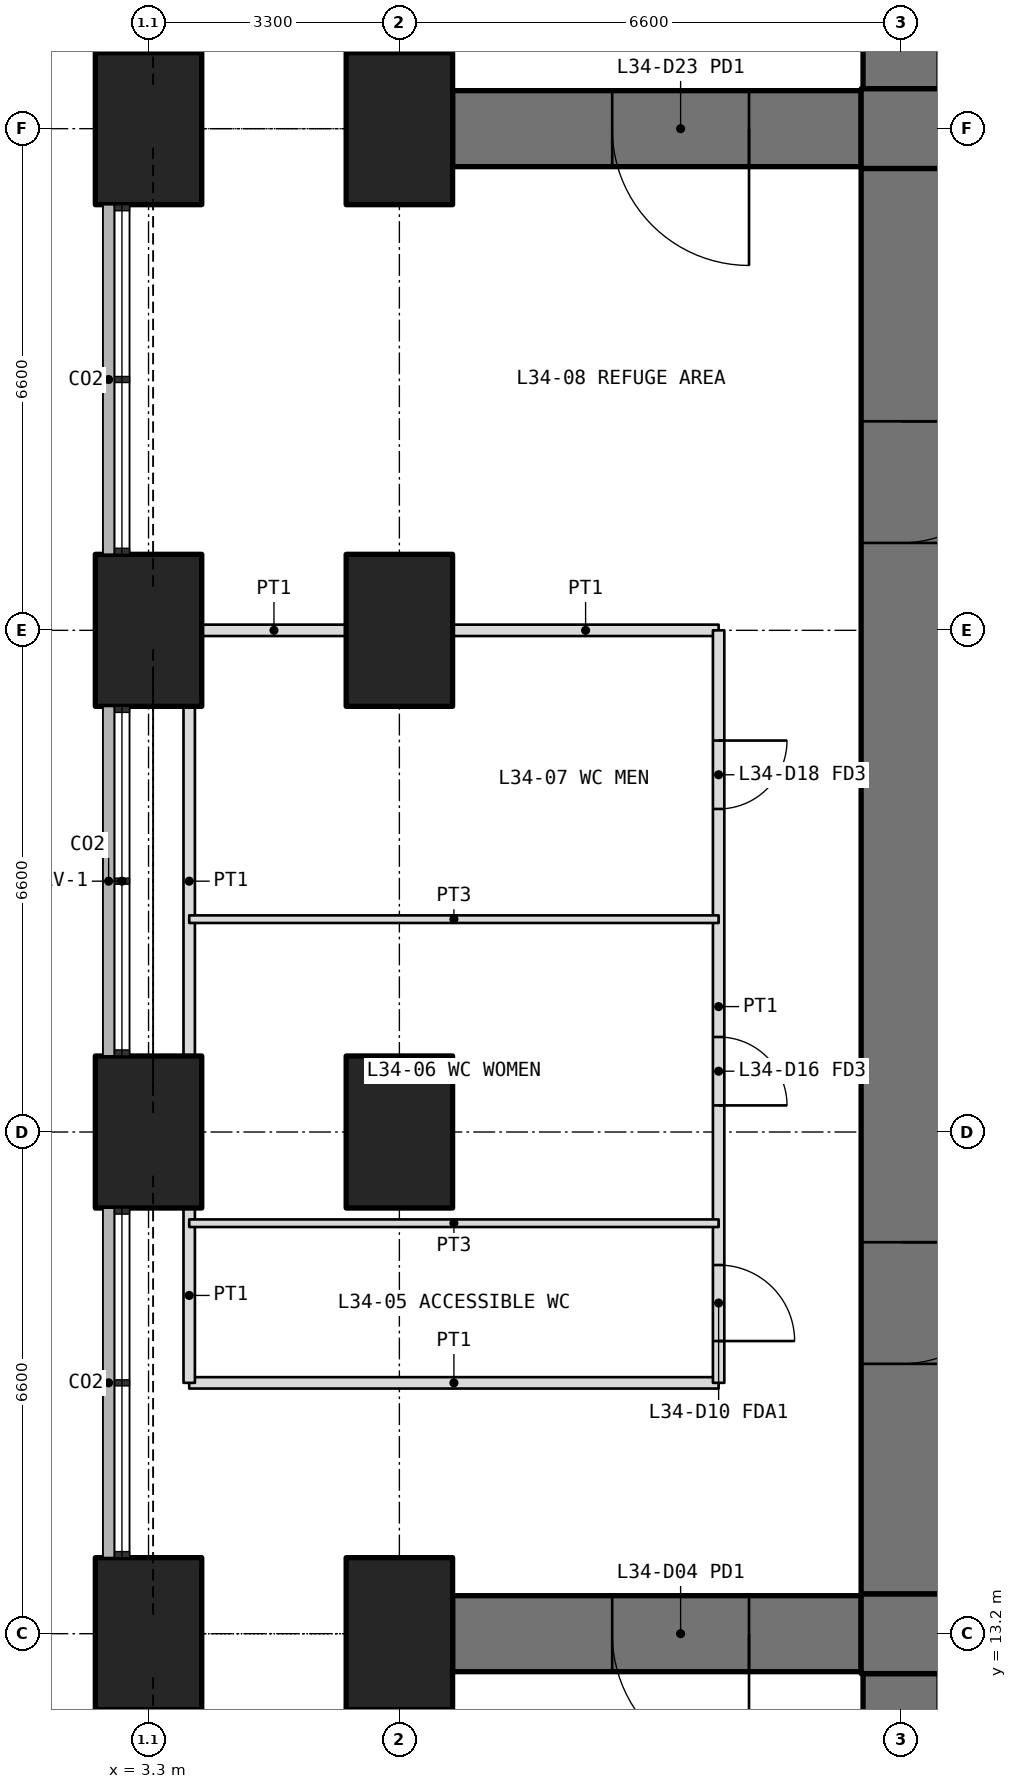
"""IFC4 building model, lengths in metres.
Left out: names, types, materials, properties, quantities, classifications, styles, units other than length and angle.
Written with IfcOpenShell. Run it as: python <this file> out.ifc"""

import sys

from ifc_helpers import new_model, si_unit, direction, frame, frame_2d, origin, origin_2d, place, context, subcontext, project, spatial, rectangle, extrude, element, fill, save


model = new_model("IFC4")
c1 = context("Model", 3, precision=1e-05, world=origin(), true_north=direction((0.0, 1.0)))
c2 = subcontext(c1, "Body", "Model", "MODEL_VIEW")
j1 = project(units=[si_unit("LENGTHUNIT", "METRE"), si_unit("PLANEANGLEUNIT", "RADIAN")], contexts=[c1])
p1 = place(None, origin())
s1 = spatial("IfcSite", under=j1, at=p1, CompositionType="ELEMENT")
p2 = place(p1, origin())
s2 = spatial("IfcBuilding", under=s1, at=p2, CompositionType="ELEMENT")
p3 = place(p2, frame((0.0, 0.0, 149.4)))
s3 = spatial("IfcBuildingStorey", under=s2, at=p3, CompositionType="ELEMENT", Elevation=149.4)
for number, where, z_axis, x_axis in (
    (1, (3.3, 13.2, 0.0), (0.0, 0.0, 1.0), (0.0, 1.0, 0.0)),
    (2, (3.3, 19.8, 0.0), (0.0, 0.0, 1.0), (0.0, 1.0, 0.0)),
    (3, (3.3, 26.4, 0.0), (0.0, 0.0, 1.0), (0.0, 1.0, 0.0)),
    (4, (3.3, 33.0, 0.0), (0.0, 0.0, 1.0), (0.0, 1.0, 0.0)),
    (5, (6.6, 13.2, 0.0), (0.0, 0.0, 1.0), (0.0, 1.0, 0.0)),
    (6, (6.6, 19.8, 0.0), (0.0, 0.0, 1.0), (0.0, 1.0, 0.0)),
    (7, (6.6, 26.4, 0.0), (0.0, 0.0, 1.0), (0.0, 1.0, 0.0)),
    (8, (6.6, 33.0, 0.0), (0.0, 0.0, 1.0), (0.0, 1.0, 0.0)),
):
    element("IfcColumn", number, at=place(p3, frame(where, z_axis=z_axis, x_axis=x_axis)), inside=s3, PredefinedType="COLUMN", context=c2, shape_type="SweptSolid", body=[
        extrude(rectangle(XDim=2.0, YDim=1.4, at=origin_2d()), origin(), (0.0, 0.0, 1.0), 6.3),
    ])
p4 = place(p3, frame((13.2, 12.675, 0.0), z_axis=(0.0, 0.0, 1.0), x_axis=(0.0, -1.0, 0.0)))
e9 = element("IfcWall", 9, at=p4, inside=s3, PredefinedType="SHEAR", context=c2, shape_type="SweptSolid", body=[
    extrude(rectangle(XDim=8.675, YDim=1.0, at=frame_2d((4.337, 0.0))), origin(), (0.0, 0.0, 1.0), 6.0),
])
p5 = place(p4, frame((1.475, 0.0, 0.0)))
e10 = element("IfcOpeningElement", 10, at=p5, cuts=e9, PredefinedType="OPENING", context=c2, shape_type="SweptSolid", body=[
    extrude(rectangle(XDim=1.8, YDim=2.4, at=frame_2d((0.9, 1.2))), frame((0.0, 0.51, 0.0), z_axis=(0.0, -1.0, 0.0), x_axis=(1.0, 0.0, 0.0)), (0.0, 0.0, 1.0), 1.02),
])
p6 = place(p3, frame((13.2, 33.525, 0.0), z_axis=(0.0, 0.0, 1.0), x_axis=(0.0, 1.0, 0.0)))
e11 = element("IfcWall", 11, at=p6, inside=s3, PredefinedType="SHEAR", context=c2, shape_type="SweptSolid", body=[
    extrude(rectangle(XDim=8.675, YDim=1.0, at=frame_2d((4.337, 0.0))), origin(), (0.0, 0.0, 1.0), 6.0),
])
p7 = place(p6, frame((1.475, 0.0, 0.0)))
e12 = element("IfcOpeningElement", 12, at=p7, cuts=e11, PredefinedType="OPENING", context=c2, shape_type="SweptSolid", body=[
    extrude(rectangle(XDim=1.8, YDim=2.4, at=frame_2d((0.9, 1.2))), frame((0.0, 0.51, 0.0), z_axis=(0.0, -1.0, 0.0), x_axis=(1.0, 0.0, 0.0)), (0.0, 0.0, 1.0), 1.02),
])
p8 = place(p3, frame((12.675, 13.2, 0.0), z_axis=(0.0, 0.0, 1.0), x_axis=(-1.0, 0.0, 0.0)))
e13 = element("IfcWall", 13, at=p8, inside=s3, PredefinedType="SHEAR", context=c2, shape_type="SweptSolid", body=[
    extrude(rectangle(XDim=5.375, YDim=1.0, at=frame_2d((2.688, 0.0))), origin(), (0.0, 0.0, 1.0), 6.0),
])
p9 = place(p8, frame((1.475, 0.0, 0.0)))
e14 = element("IfcOpeningElement", 14, at=p9, cuts=e13, PredefinedType="OPENING", context=c2, shape_type="SweptSolid", body=[
    extrude(rectangle(XDim=1.8, YDim=2.4, at=frame_2d((0.9, 1.2))), frame((0.0, 0.51, 0.0), z_axis=(0.0, -1.0, 0.0), x_axis=(1.0, 0.0, 0.0)), (0.0, 0.0, 1.0), 1.02),
])
p10 = place(p3, frame((12.675, 33.0, 0.0), z_axis=(0.0, 0.0, 1.0), x_axis=(-1.0, 0.0, 0.0)))
e15 = element("IfcWall", 15, at=p10, inside=s3, PredefinedType="SHEAR", context=c2, shape_type="SweptSolid", body=[
    extrude(rectangle(XDim=5.375, YDim=1.0, at=frame_2d((2.688, 0.0))), origin(), (0.0, 0.0, 1.0), 6.0),
])
p11 = place(p10, frame((1.475, 0.0, 0.0)))
e16 = element("IfcOpeningElement", 16, at=p11, cuts=e15, PredefinedType="OPENING", context=c2, shape_type="SweptSolid", body=[
    extrude(rectangle(XDim=1.8, YDim=2.4, at=frame_2d((0.9, 1.2))), frame((0.0, 0.51, 0.0), z_axis=(0.0, -1.0, 0.0), x_axis=(1.0, 0.0, 0.0)), (0.0, 0.0, 1.0), 1.02),
])
for number, where, z_axis, x_axis in (
    (17, (12.675, 13.2, 0.0), (0.0, 0.0, 1.0), (1.0, 0.0, 0.0)),
    (18, (40.125, 33.0, 0.0), (0.0, 0.0, 1.0), (-1.0, 0.0, 0.0)),
):
    element("IfcWall", number, at=place(p3, frame(where, z_axis=z_axis, x_axis=x_axis)), inside=s3, PredefinedType="SHEAR", context=c2, shape_type="SweptSolid", body=[
        extrude(rectangle(XDim=27.45, YDim=1.05, at=frame_2d((13.725, 0.0))), origin(), (0.0, 0.0, 1.0), 6.3),
    ])
p12 = place(p3, frame((13.2, 32.475, 0.0), z_axis=(0.0, 0.0, 1.0), x_axis=(0.0, -1.0, 0.0)))
e19 = element("IfcWall", 19, at=p12, inside=s3, PredefinedType="SHEAR", context=c2, shape_type="SweptSolid", body=[
    extrude(rectangle(XDim=18.75, YDim=1.05, at=frame_2d((9.375, 0.0))), origin(), (0.0, 0.0, 1.0), 6.3),
])
p13 = place(p12, frame((14.125, 0.0, 0.0)))
e20 = element("IfcOpeningElement", 20, at=p13, cuts=e19, PredefinedType="OPENING", context=c2, shape_type="SweptSolid", body=[
    extrude(rectangle(XDim=1.6, YDim=2.1, at=frame_2d((0.8, 1.05))), frame((0.0, 0.535, 0.0), z_axis=(0.0, -1.0, 0.0), x_axis=(1.0, 0.0, 0.0)), (0.0, 0.0, 1.0), 1.07),
])
p14 = place(p12, frame((3.325, 0.0, 0.0)))
e21 = element("IfcOpeningElement", 21, at=p14, cuts=e19, PredefinedType="OPENING", context=c2, shape_type="SweptSolid", body=[
    extrude(rectangle(XDim=1.6, YDim=2.1, at=frame_2d((0.8, 1.05))), frame((0.0, 0.535, 0.0), z_axis=(0.0, -1.0, 0.0), x_axis=(1.0, 0.0, 0.0)), (0.0, 0.0, 1.0), 1.07),
])
p15 = place(p3, frame((10.8, 16.5, 0.0), z_axis=(0.0, 0.0, 1.0), x_axis=(-1.0, 0.0, 0.0)))
e22 = element("IfcWall", 22, at=p15, inside=s3, PredefinedType="PARTITIONING", context=c2, shape_type="SweptSolid", body=[
    extrude(rectangle(XDim=6.965, YDim=0.15, at=frame_2d((3.482, 0.0))), origin(), (0.0, 0.0, 1.0), 4.0),
])
p16 = place(p3, frame((4.0, 26.4, 0.0), z_axis=(0.0, 0.0, 1.0), x_axis=(1.0, 0.0, 0.0)))
e23 = element("IfcWall", 23, at=p16, inside=s3, PredefinedType="PARTITIONING", context=c2, shape_type="SweptSolid", body=[
    extrude(rectangle(XDim=1.9, YDim=0.15, at=frame_2d((0.95, 0.0))), origin(), (0.0, 0.0, 1.0), 4.0),
])
p17 = place(p3, frame((7.3, 26.4, 0.0), z_axis=(0.0, 0.0, 1.0), x_axis=(1.0, 0.0, 0.0)))
e24 = element("IfcWall", 24, at=p17, inside=s3, PredefinedType="PARTITIONING", context=c2, shape_type="SweptSolid", body=[
    extrude(rectangle(XDim=3.5, YDim=0.15, at=frame_2d((1.75, 0.0))), origin(), (0.0, 0.0, 1.0), 4.0),
])
p18 = place(p3, frame((3.835, 16.5, 0.0), z_axis=(0.0, 0.0, 1.0), x_axis=(0.0, 1.0, 0.0)))
e25 = element("IfcWall", 25, at=p18, inside=s3, PredefinedType="PARTITIONING", context=c2, shape_type="SweptSolid", body=[
    extrude(rectangle(XDim=2.3, YDim=0.15, at=frame_2d((1.15, 0.0))), origin(), (0.0, 0.0, 1.0), 4.0),
])
p19 = place(p3, frame((3.835, 20.8, 0.0), z_axis=(0.0, 0.0, 1.0), x_axis=(0.0, 1.0, 0.0)))
e26 = element("IfcWall", 26, at=p19, inside=s3, PredefinedType="PARTITIONING", context=c2, shape_type="SweptSolid", body=[
    extrude(rectangle(XDim=4.6, YDim=0.15, at=frame_2d((2.3, 0.0))), origin(), (0.0, 0.0, 1.0), 4.0),
])
p20 = place(p3, frame((10.8, 26.4, 0.0), z_axis=(0.0, 0.0, 1.0), x_axis=(0.0, -1.0, 0.0)))
e27 = element("IfcWall", 27, at=p20, inside=s3, PredefinedType="PARTITIONING", context=c2, shape_type="SweptSolid", body=[
    extrude(rectangle(XDim=9.9, YDim=0.15, at=frame_2d((4.95, 0.0))), origin(), (0.0, 0.0, 1.0), 4.0),
])
p21 = place(p20, frame((8.35, 0.0, 0.0)))
e28 = element("IfcOpeningElement", 28, at=p21, cuts=e27, PredefinedType="OPENING", context=c2, shape_type="SweptSolid", body=[
    extrude(rectangle(XDim=1.0, YDim=2.1, at=frame_2d((0.5, 1.05))), frame((0.0, 0.085, 0.0), z_axis=(0.0, -1.0, 0.0), x_axis=(1.0, 0.0, 0.0)), (0.0, 0.0, 1.0), 0.17),
])
p22 = place(p20, frame((5.35, 0.0, 0.0)))
e29 = element("IfcOpeningElement", 29, at=p22, cuts=e27, PredefinedType="OPENING", context=c2, shape_type="SweptSolid", body=[
    extrude(rectangle(XDim=0.9, YDim=2.1, at=frame_2d((0.45, 1.05))), frame((0.0, 0.085, 0.0), z_axis=(0.0, -1.0, 0.0), x_axis=(1.0, 0.0, 0.0)), (0.0, 0.0, 1.0), 0.17),
])
p23 = place(p20, frame((1.45, 0.0, 0.0)))
e30 = element("IfcOpeningElement", 30, at=p23, cuts=e27, PredefinedType="OPENING", context=c2, shape_type="SweptSolid", body=[
    extrude(rectangle(XDim=0.9, YDim=2.1, at=frame_2d((0.45, 1.05))), frame((0.0, 0.085, 0.0), z_axis=(0.0, -1.0, 0.0), x_axis=(1.0, 0.0, 0.0)), (0.0, 0.0, 1.0), 0.17),
])
for number, where, z_axis, x_axis in (
    (31, (3.835, 18.6, 0.0), (0.0, 0.0, 1.0), (1.0, 0.0, 0.0)),
    (32, (3.835, 22.6, 0.0), (0.0, 0.0, 1.0), (1.0, 0.0, 0.0)),
):
    element("IfcWall", number, at=place(p3, frame(where, z_axis=z_axis, x_axis=x_axis)), inside=s3, PredefinedType="PARTITIONING", context=c2, shape_type="SweptSolid", body=[
        extrude(rectangle(XDim=6.965, YDim=0.1, at=frame_2d((3.482, 0.0))), origin(), (0.0, 0.0, 1.0), 4.0),
    ])
p24 = place(p21, origin())
e33 = element("IfcDoor", 33, at=p24, inside=s3, OperationType="SINGLE_SWING_RIGHT", PredefinedType="DOOR", context=c2, shape_type="SweptSolid", body=[
    extrude(rectangle(XDim=1.0, YDim=2.1, at=frame_2d((0.5, 1.05))), frame((0.0, 0.025, 0.0), z_axis=(0.0, -1.0, 0.0), x_axis=(1.0, 0.0, 0.0)), (0.0, 0.0, 1.0), 0.05),
])
fill(e28, e33)
p25 = place(p22, origin())
e34 = element("IfcDoor", 34, at=p25, inside=s3, OperationType="SINGLE_SWING_RIGHT", PredefinedType="DOOR", context=c2, shape_type="SweptSolid", body=[
    extrude(rectangle(XDim=0.9, YDim=2.1, at=frame_2d((0.45, 1.05))), frame((0.0, 0.025, 0.0), z_axis=(0.0, -1.0, 0.0), x_axis=(1.0, 0.0, 0.0)), (0.0, 0.0, 1.0), 0.05),
])
fill(e29, e34)
p26 = place(p23, origin())
e35 = element("IfcDoor", 35, at=p26, inside=s3, OperationType="SINGLE_SWING_LEFT", PredefinedType="DOOR", context=c2, shape_type="SweptSolid", body=[
    extrude(rectangle(XDim=0.9, YDim=2.1, at=frame_2d((0.45, 1.05))), frame((0.0, 0.025, 0.0), z_axis=(0.0, -1.0, 0.0), x_axis=(1.0, 0.0, 0.0)), (0.0, 0.0, 1.0), 0.05),
])
fill(e30, e35)
p27 = place(p9, origin())
e36 = element("IfcDoor", 36, at=p27, inside=s3, OperationType="DOUBLE_DOOR_SINGLE_SWING", PredefinedType="DOOR", context=c2, shape_type="SweptSolid", body=[
    extrude(rectangle(XDim=1.8, YDim=2.4, at=frame_2d((0.9, 1.2))), frame((0.0, 0.025, 0.0), z_axis=(0.0, -1.0, 0.0), x_axis=(1.0, 0.0, 0.0)), (0.0, 0.0, 1.0), 0.05),
])
fill(e14, e36)
p28 = place(p11, origin())
e37 = element("IfcDoor", 37, at=p28, inside=s3, OperationType="DOUBLE_DOOR_SINGLE_SWING", PredefinedType="DOOR", context=c2, shape_type="SweptSolid", body=[
    extrude(rectangle(XDim=1.8, YDim=2.4, at=frame_2d((0.9, 1.2))), frame((0.0, 0.025, 0.0), z_axis=(0.0, -1.0, 0.0), x_axis=(1.0, 0.0, 0.0)), (0.0, 0.0, 1.0), 0.05),
])
fill(e16, e37)
p29 = place(p13, origin())
e38 = element("IfcDoor", 38, at=p29, inside=s3, OperationType="DOUBLE_DOOR_DOUBLE_SWING", PredefinedType="DOOR", context=c2, shape_type="SweptSolid", body=[
    extrude(rectangle(XDim=1.6, YDim=2.1, at=frame_2d((0.8, 1.05))), frame((0.0, 0.025, 0.0), z_axis=(0.0, -1.0, 0.0), x_axis=(1.0, 0.0, 0.0)), (0.0, 0.0, 1.0), 0.05),
])
fill(e20, e38)
p30 = place(p14, origin())
e39 = element("IfcDoor", 39, at=p30, inside=s3, OperationType="DOUBLE_DOOR_DOUBLE_SWING", PredefinedType="DOOR", context=c2, shape_type="SweptSolid", body=[
    extrude(rectangle(XDim=1.6, YDim=2.1, at=frame_2d((0.8, 1.05))), frame((0.0, 0.025, 0.0), z_axis=(0.0, -1.0, 0.0), x_axis=(1.0, 0.0, 0.0)), (0.0, 0.0, 1.0), 0.05),
])
fill(e21, e39)
save(model, sys.argv[1])
